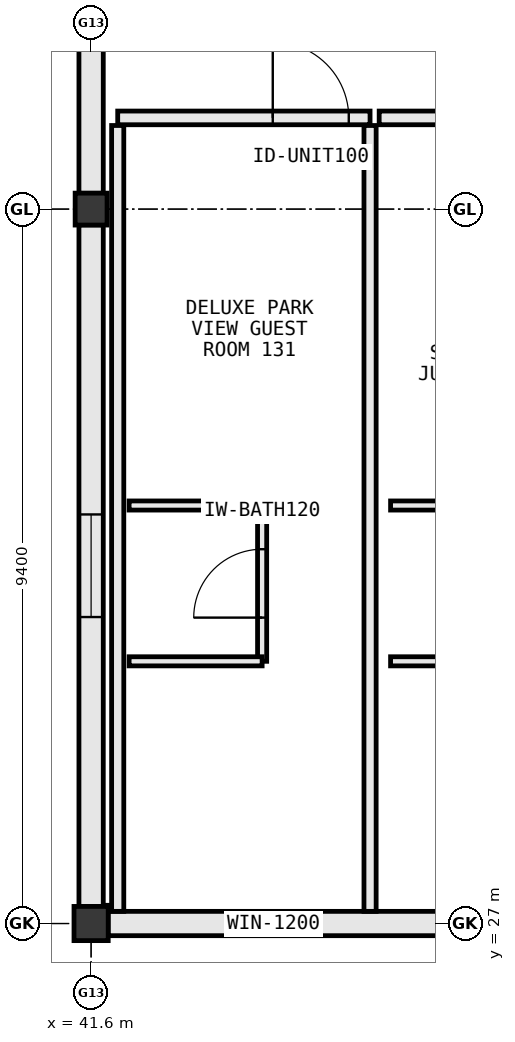
"""IFC4 building model, lengths in metres.
Left out: names, types, materials, properties, quantities, classifications, styles, units other than length and angle.
Written with IfcOpenShell. Run it as: python <this file> out.ifc"""

import sys

from ifc_helpers import new_model, si_unit, direction, frame, frame_2d, origin, origin_2d, place, context, subcontext, project, spatial, rectangle, extrude, element, fill, save


model = new_model("IFC4")
c1 = context("Model", 3, precision=1e-05, world=origin(), true_north=direction((0.0, 1.0)))
c2 = subcontext(c1, "Body", "Model", "MODEL_VIEW")
j1 = project(units=[si_unit("LENGTHUNIT", "METRE"), si_unit("PLANEANGLEUNIT", "RADIAN")], contexts=[c1])
p1 = place(None, origin())
s1 = spatial("IfcSite", under=j1, at=p1, CompositionType="ELEMENT")
p2 = place(p1, origin())
s2 = spatial("IfcBuilding", under=s1, at=p2, CompositionType="ELEMENT")
p3 = place(p2, frame((0.0, 0.0, 20.0)))
s3 = spatial("IfcBuildingStorey", under=s2, at=p3, CompositionType="ELEMENT", Elevation=20.0)
p4 = place(p3, frame((41.6, 27.0, 0.0), z_axis=(0.0, 0.0, 1.0), x_axis=(1.0, 0.0, 0.0)))
e1 = element("IfcColumn", 1, at=p4, inside=s3, PredefinedType="COLUMN", context=c2, shape_type="SweptSolid", body=[
    extrude(rectangle(XDim=0.45, YDim=0.45, at=origin_2d()), origin(), (0.0, 0.0, 1.0), 3.8),
])
p5 = place(p3, frame((41.6, 36.4, 0.0), z_axis=(0.0, 0.0, 1.0), x_axis=(1.0, 0.0, 0.0)))
e2 = element("IfcColumn", 2, at=p5, inside=s3, PredefinedType="COLUMN", context=c2, shape_type="SweptSolid", body=[
    extrude(rectangle(XDim=0.42, YDim=0.42, at=origin_2d()), origin(), (0.0, 0.0, 1.0), 3.8),
])
p6 = place(p3, frame((41.6, 46.992, 0.0), z_axis=(0.0, 0.0, 1.0), x_axis=(0.0, -1.0, 0.0)))
e3 = element("IfcWall", 3, at=p6, inside=s3, PredefinedType="STANDARD", context=c2, shape_type="SweptSolid", body=[
    extrude(rectangle(XDim=10.384, YDim=0.32, at=frame_2d((5.192, 0.0))), origin(), (0.0, 0.0, 1.0), 2.905),
])
p7 = place(p6, frame((1.921, 0.0, 0.85)))
e4 = element("IfcOpeningElement", 4, at=p7, cuts=e3, PredefinedType="OPENING", context=c2, shape_type="SweptSolid", body=[
    extrude(rectangle(XDim=1.35, YDim=1.65, at=frame_2d((0.675, 0.825))), frame((0.0, 0.172, 0.0), z_axis=(0.0, -1.0, 0.0), x_axis=(1.0, 0.0, 0.0)), (0.0, 0.0, 1.0), 0.344),
])
p8 = place(p6, frame((7.113, 0.0, 0.85)))
e5 = element("IfcOpeningElement", 5, at=p8, cuts=e3, PredefinedType="OPENING", context=c2, shape_type="SweptSolid", body=[
    extrude(rectangle(XDim=1.35, YDim=1.65, at=frame_2d((0.675, 0.825))), frame((0.0, 0.172, 0.0), z_axis=(0.0, -1.0, 0.0), x_axis=(1.0, 0.0, 0.0)), (0.0, 0.0, 1.0), 0.344),
])
p9 = place(p3, frame((41.6, 36.192, 0.0), z_axis=(0.0, 0.0, 1.0), x_axis=(0.0, -1.0, 0.0)))
e6 = element("IfcWall", 6, at=p9, inside=s3, PredefinedType="STANDARD", context=c2, shape_type="SweptSolid", body=[
    extrude(rectangle(XDim=8.969, YDim=0.32, at=frame_2d((4.484, 0.0))), origin(), (0.0, 0.0, 1.0), 2.925),
])
p10 = place(p9, frame((3.81, 0.0, 0.85)))
e7 = element("IfcOpeningElement", 7, at=p10, cuts=e6, PredefinedType="OPENING", context=c2, shape_type="SweptSolid", body=[
    extrude(rectangle(XDim=1.35, YDim=1.65, at=frame_2d((0.675, 0.825))), frame((0.0, 0.172, 0.0), z_axis=(0.0, -1.0, 0.0), x_axis=(1.0, 0.0, 0.0)), (0.0, 0.0, 1.0), 0.344),
])
p11 = place(p3, frame((41.823, 27.0, 0.0), z_axis=(0.0, 0.0, 1.0), x_axis=(1.0, 0.0, 0.0)))
e8 = element("IfcWall", 8, at=p11, inside=s3, PredefinedType="STANDARD", context=c2, shape_type="SweptSolid", body=[
    extrude(rectangle(XDim=4.354, YDim=0.32, at=frame_2d((2.177, 0.0))), origin(), (0.0, 0.0, 1.0), 3.005),
])
p12 = place(p11, frame((1.577, 0.0, 0.85)))
e9 = element("IfcOpeningElement", 9, at=p12, cuts=e8, PredefinedType="OPENING", context=c2, shape_type="SweptSolid", body=[
    extrude(rectangle(XDim=1.2, YDim=1.55, at=frame_2d((0.6, 0.775))), frame((0.0, 0.172, 0.0), z_axis=(0.0, -1.0, 0.0), x_axis=(1.0, 0.0, 0.0)), (0.0, 0.0, 1.0), 0.344),
])
p13 = place(p3, frame((45.27, 37.6, 0.0), z_axis=(0.0, 0.0, 1.0), x_axis=(-1.0, 0.0, 0.0)))
e10 = element("IfcWall", 10, at=p13, inside=s3, PredefinedType="PARTITIONING", context=c2, shape_type="SweptSolid", body=[
    extrude(rectangle(XDim=3.32, YDim=0.18, at=frame_2d((1.66, 0.0))), origin(), (0.0, 0.0, 1.0), 3.55),
])
p14 = place(p13, frame((0.28, 0.0, 0.0)))
e11 = element("IfcOpeningElement", 11, at=p14, cuts=e10, PredefinedType="OPENING", context=c2, shape_type="SweptSolid", body=[
    extrude(rectangle(XDim=1.0, YDim=2.2, at=frame_2d((0.5, 1.1))), frame((0.0, 0.102, 0.0), z_axis=(0.0, -1.0, 0.0), x_axis=(1.0, 0.0, 0.0)), (0.0, 0.0, 1.0), 0.204),
])
p15 = place(p3, frame((41.95, 27.16, 0.0), z_axis=(0.0, 0.0, 1.0), x_axis=(0.0, 1.0, 0.0)))
e12 = element("IfcWall", 12, at=p15, inside=s3, PredefinedType="PARTITIONING", context=c2, shape_type="SweptSolid", body=[
    extrude(rectangle(XDim=10.34, YDim=0.16, at=frame_2d((5.17, 0.0))), origin(), (0.0, 0.0, 1.0), 2.905),
])
p16 = place(p3, frame((45.27, 27.16, 0.0), z_axis=(0.0, 0.0, 1.0), x_axis=(0.0, 1.0, 0.0)))
e13 = element("IfcWall", 13, at=p16, inside=s3, PredefinedType="PARTITIONING", context=c2, shape_type="SweptSolid", body=[
    extrude(rectangle(XDim=10.34, YDim=0.16, at=frame_2d((5.17, 0.0))), origin(), (0.0, 0.0, 1.0), 3.55),
])
p17 = place(p3, frame((42.1, 32.5, 0.0), z_axis=(0.0, 0.0, 1.0), x_axis=(1.0, 0.0, 0.0)))
e14 = element("IfcWall", 14, at=p17, inside=s3, PredefinedType="PARTITIONING", context=c2, shape_type="SweptSolid", body=[
    extrude(rectangle(XDim=1.75, YDim=0.12, at=frame_2d((0.875, 0.0))), origin(), (0.0, 0.0, 1.0), 3.55),
])
p18 = place(p3, frame((43.85, 30.45, 0.0), z_axis=(0.0, 0.0, 1.0), x_axis=(0.0, 1.0, 0.0)))
e15 = element("IfcWall", 15, at=p18, inside=s3, PredefinedType="PARTITIONING", context=c2, shape_type="SweptSolid", body=[
    extrude(rectangle(XDim=2.05, YDim=0.12, at=frame_2d((1.025, 0.0))), origin(), (0.0, 0.0, 1.0), 3.095),
])
p19 = place(p18, frame((0.575, 0.0, 0.0)))
e16 = element("IfcOpeningElement", 16, at=p19, cuts=e15, PredefinedType="OPENING", context=c2, shape_type="SweptSolid", body=[
    extrude(rectangle(XDim=0.9, YDim=2.15, at=frame_2d((0.45, 1.075))), frame((0.0, 0.072, 0.0), z_axis=(0.0, -1.0, 0.0), x_axis=(1.0, 0.0, 0.0)), (0.0, 0.0, 1.0), 0.144),
])
p20 = place(p3, frame((42.1, 30.45, 0.0), z_axis=(0.0, 0.0, 1.0), x_axis=(1.0, 0.0, 0.0)))
e17 = element("IfcWall", 17, at=p20, inside=s3, PredefinedType="PARTITIONING", context=c2, shape_type="SweptSolid", body=[
    extrude(rectangle(XDim=1.75, YDim=0.12, at=frame_2d((0.875, 0.0))), origin(), (0.0, 0.0, 1.0), 3.55),
])
p21 = place(p3, frame((48.71, 37.6, 0.0), z_axis=(0.0, 0.0, 1.0), x_axis=(-1.0, 0.0, 0.0)))
e18 = element("IfcWall", 18, at=p21, inside=s3, PredefinedType="PARTITIONING", context=c2, shape_type="SweptSolid", body=[
    extrude(rectangle(XDim=3.32, YDim=0.18, at=frame_2d((1.66, 0.0))), origin(), (0.0, 0.0, 1.0), 3.55),
])
p22 = place(p21, frame((0.28, 0.0, 0.0)))
e19 = element("IfcOpeningElement", 19, at=p22, cuts=e18, PredefinedType="OPENING", context=c2, shape_type="SweptSolid", body=[
    extrude(rectangle(XDim=1.0, YDim=2.2, at=frame_2d((0.5, 1.1))), frame((0.0, 0.102, 0.0), z_axis=(0.0, -1.0, 0.0), x_axis=(1.0, 0.0, 0.0)), (0.0, 0.0, 1.0), 0.204),
])
for number, where, z_axis, x_axis in (
    (20, (45.54, 32.5, 0.0), (0.0, 0.0, 1.0), (1.0, 0.0, 0.0)),
    (21, (45.54, 30.45, 0.0), (0.0, 0.0, 1.0), (1.0, 0.0, 0.0)),
):
    element("IfcWall", number, at=place(p3, frame(where, z_axis=z_axis, x_axis=x_axis)), inside=s3, PredefinedType="PARTITIONING", context=c2, shape_type="SweptSolid", body=[
        extrude(rectangle(XDim=1.75, YDim=0.12, at=frame_2d((0.875, 0.0))), origin(), (0.0, 0.0, 1.0), 3.55),
    ])
p23 = place(p10, origin())
e22 = element("IfcWindow", 22, at=p23, inside=s3, PartitioningType="SINGLE_PANEL", PredefinedType="WINDOW", context=c2, shape_type="SweptSolid", body=[
    extrude(rectangle(XDim=1.35, YDim=1.65, at=frame_2d((0.675, 0.825))), frame((0.0, 0.03, 0.0), z_axis=(0.0, -1.0, 0.0), x_axis=(1.0, 0.0, 0.0)), (0.0, 0.0, 1.0), 0.06),
])
fill(e7, e22)
p24 = place(p12, origin())
e23 = element("IfcWindow", 23, at=p24, inside=s3, PartitioningType="SINGLE_PANEL", PredefinedType="WINDOW", context=c2, shape_type="SweptSolid", body=[
    extrude(rectangle(XDim=1.2, YDim=1.55, at=frame_2d((0.6, 0.775))), frame((0.0, 0.03, 0.0), z_axis=(0.0, -1.0, 0.0), x_axis=(1.0, 0.0, 0.0)), (0.0, 0.0, 1.0), 0.06),
])
fill(e9, e23)
p25 = place(p14, frame((1.0, 0.0, 0.0), z_axis=(0.0, 0.0, 1.0), x_axis=(-1.0, 0.0, 0.0)))
e24 = element("IfcDoor", 24, at=p25, inside=s3, OperationType="SINGLE_SWING_RIGHT", PredefinedType="DOOR", context=c2, shape_type="SweptSolid", body=[
    extrude(rectangle(XDim=1.0, YDim=2.2, at=frame_2d((0.5, 1.1))), frame((0.0, 0.025, 0.0), z_axis=(0.0, -1.0, 0.0), x_axis=(1.0, 0.0, 0.0)), (0.0, 0.0, 1.0), 0.05),
])
fill(e11, e24)
p26 = place(p19, origin())
e25 = element("IfcDoor", 25, at=p26, inside=s3, OperationType="SINGLE_SWING_LEFT", PredefinedType="DOOR", context=c2, shape_type="SweptSolid", body=[
    extrude(rectangle(XDim=0.9, YDim=2.15, at=frame_2d((0.45, 1.075))), frame((0.0, 0.025, 0.0), z_axis=(0.0, -1.0, 0.0), x_axis=(1.0, 0.0, 0.0)), (0.0, 0.0, 1.0), 0.05),
])
fill(e16, e25)
save(model, sys.argv[1])
